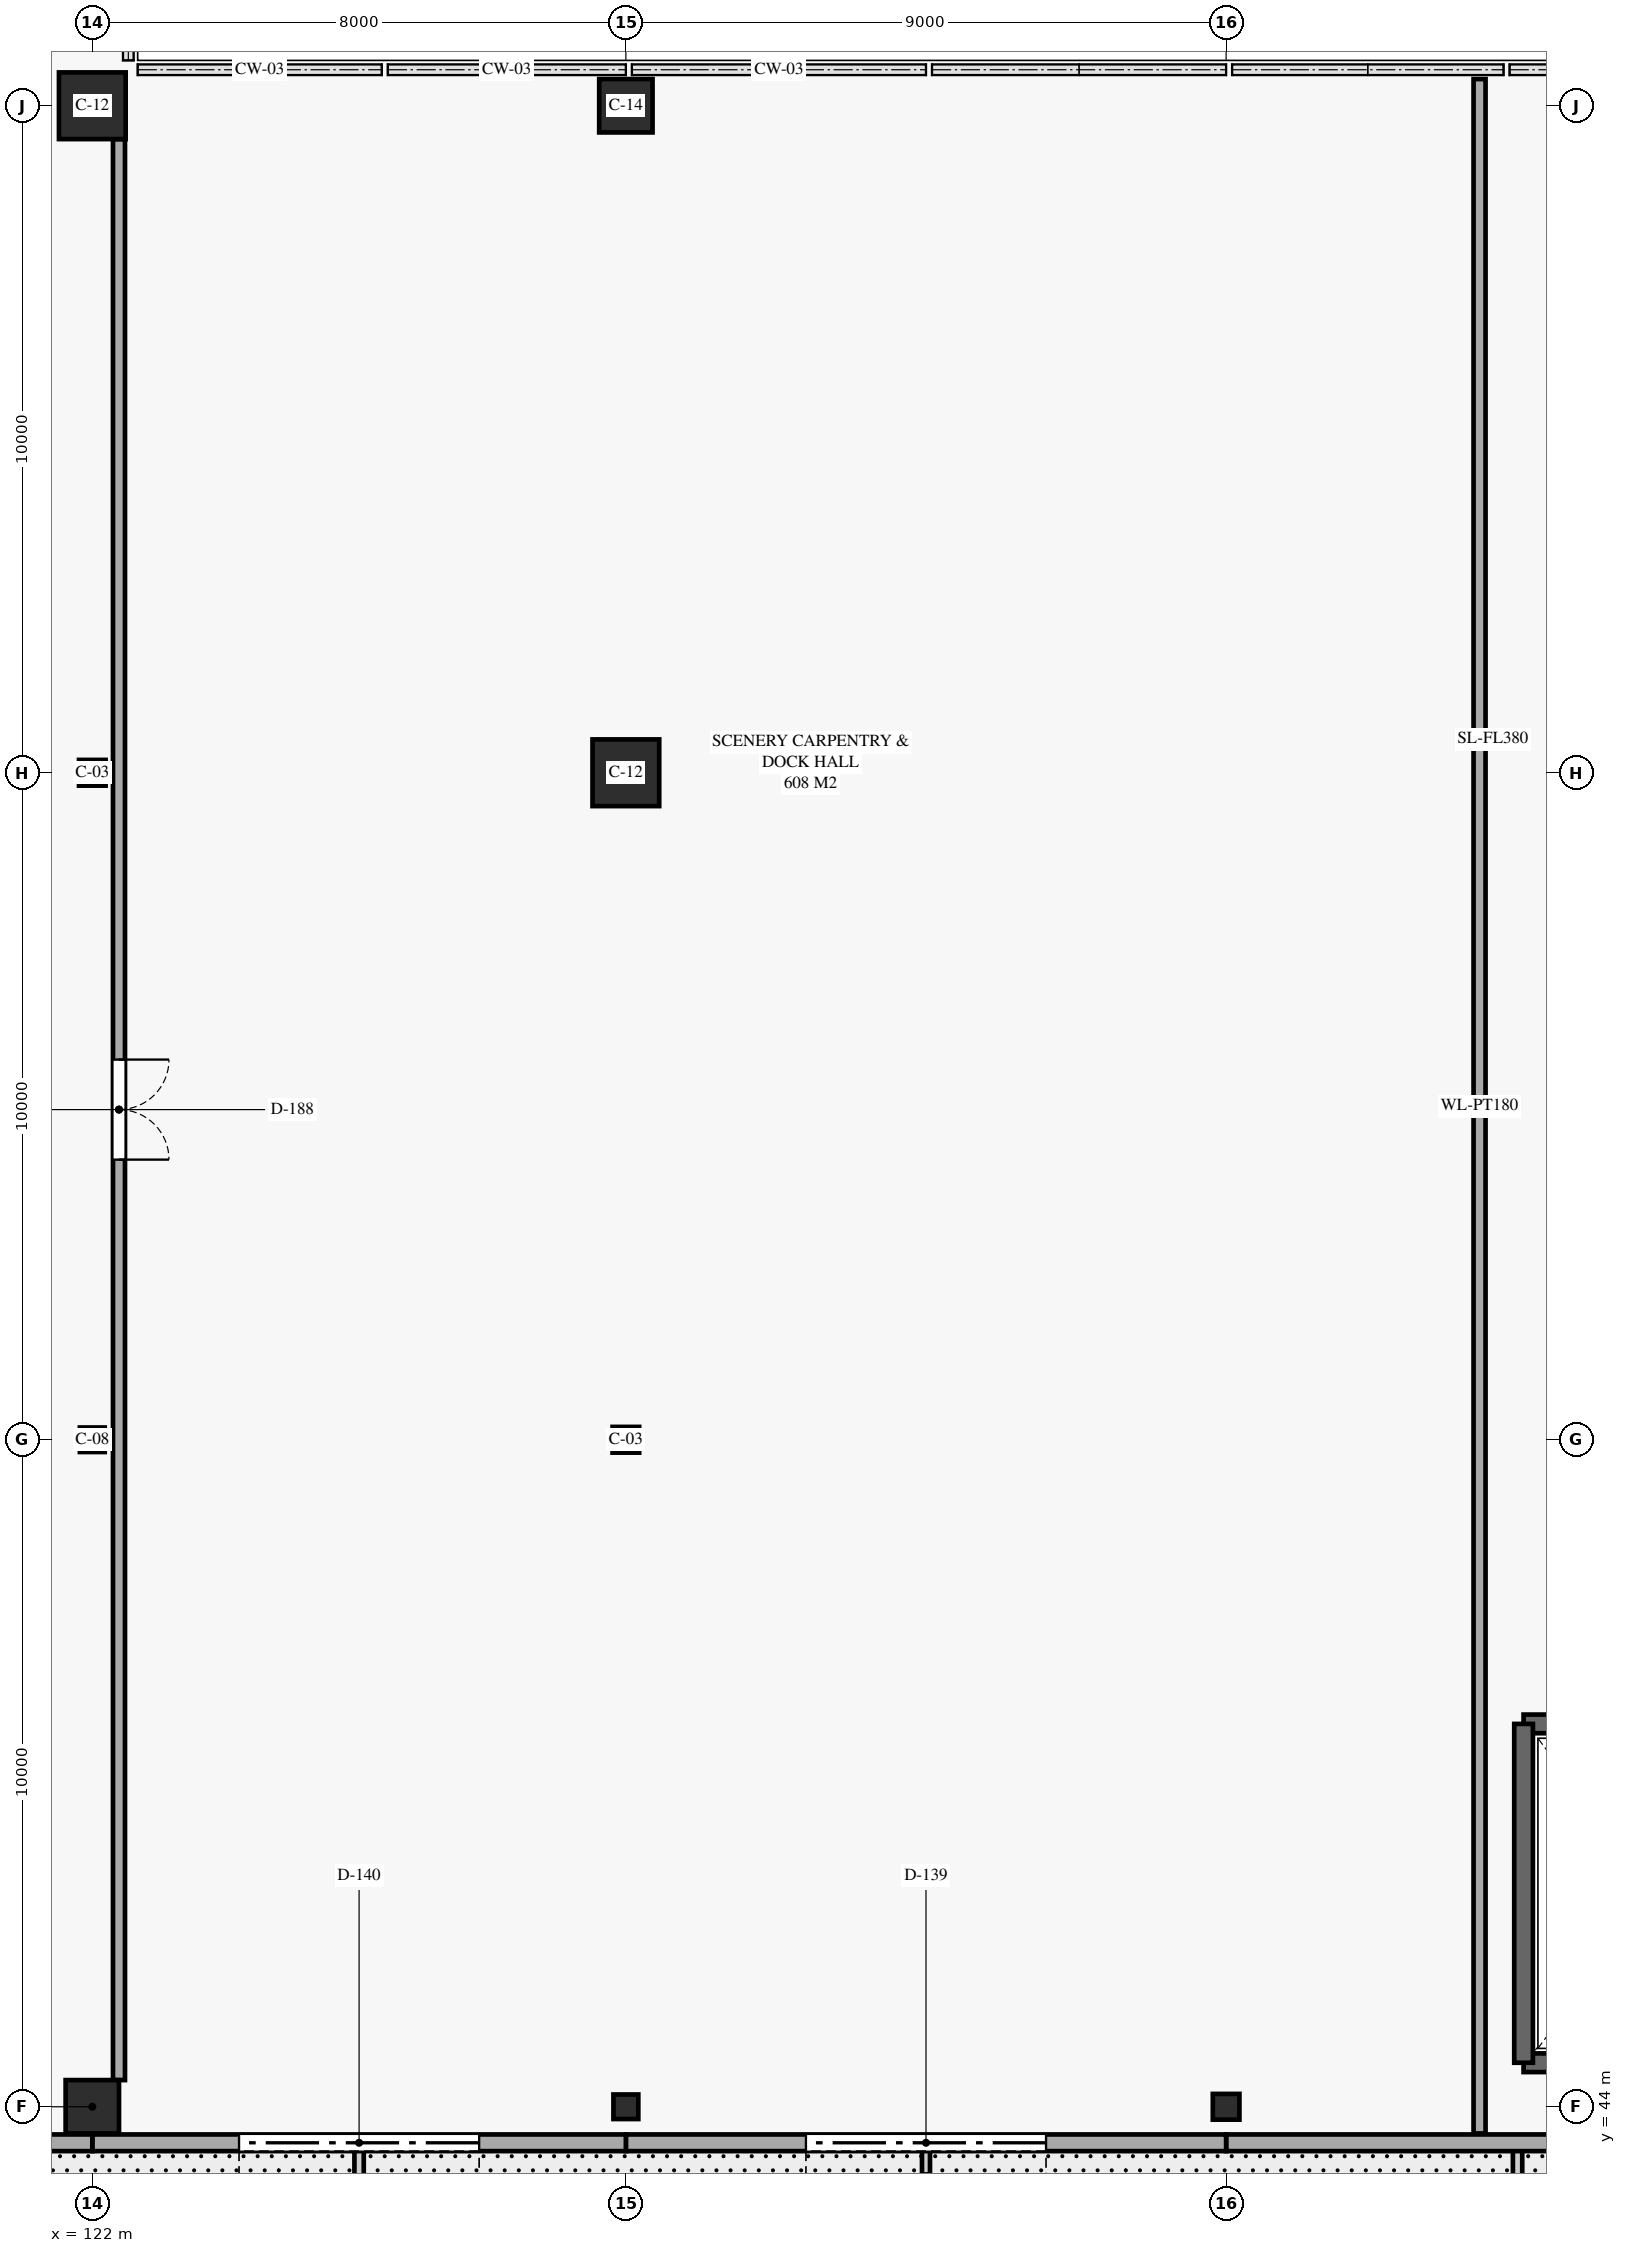
"""IFC4 building model, lengths in metres.
Left out: names, types, materials, properties, quantities, classifications, styles, units other than length and angle.
Written with IfcOpenShell. Run it as: python <this file> out.ifc"""

import sys

from ifc_helpers import new_model, si_unit, direction, frame, frame_2d, origin, origin_2d, place, context, subcontext, project, spatial, rectangle, i_section, extrude, element, fill, save


model = new_model("IFC4")
c1 = context("Model", 3, precision=1e-05, world=origin(), true_north=direction((0.0, 1.0)))
c2 = subcontext(c1, "Body", "Model", "MODEL_VIEW")
j1 = project(units=[si_unit("LENGTHUNIT", "METRE"), si_unit("PLANEANGLEUNIT", "RADIAN")], contexts=[c1])
p1 = place(None, origin())
s1 = spatial("IfcSite", under=j1, at=p1, CompositionType="ELEMENT")
p2 = place(p1, origin())
s2 = spatial("IfcBuilding", under=s1, at=p2, CompositionType="ELEMENT")
p3 = place(p2, origin())
s3 = spatial("IfcBuildingStorey", under=s2, at=p3, CompositionType="ELEMENT", Elevation=0.0)
p4 = place(p3, frame((122.0, 44.0, 0.0), z_axis=(0.0, 0.0, 1.0), x_axis=(1.0, 0.0, 0.0)))
e1 = element("IfcColumn", 1, at=p4, inside=s3, PredefinedType="COLUMN", context=c2, shape_type="SweptSolid", body=[
    extrude(rectangle(XDim=0.8, YDim=0.8, at=origin_2d()), origin(), (0.0, 0.0, 1.0), 5.0),
])
p5 = place(p3, frame((122.0, 54.0, 0.0), z_axis=(0.0, 0.0, 1.0), x_axis=(1.0, 0.0, 0.0)))
e2 = element("IfcColumn", 2, at=p5, inside=s3, PredefinedType="COLUMN", context=c2, shape_type="SweptSolid", body=[
    extrude(i_section(OverallWidth=0.373, OverallDepth=0.368, WebThickness=0.015, FlangeThickness=0.024, FilletRadius=0.015, at=origin_2d()), origin(), (0.0, 0.0, 1.0), 5.0),
])
p6 = place(p3, frame((122.0, 64.0, 0.0), z_axis=(0.0, 0.0, 1.0), x_axis=(1.0, 0.0, 0.0)))
e3 = element("IfcColumn", 3, at=p6, inside=s3, PredefinedType="COLUMN", context=c2, shape_type="SweptSolid", body=[
    extrude(i_section(OverallWidth=0.399, OverallDepth=0.386, WebThickness=0.021, FlangeThickness=0.033, FilletRadius=0.016, at=origin_2d()), origin(), (0.0, 0.0, 1.0), 5.0),
])
p7 = place(p3, frame((122.0, 74.0, 0.0), z_axis=(0.0, 0.0, 1.0), x_axis=(1.0, 0.0, 0.0)))
e4 = element("IfcColumn", 4, at=p7, inside=s3, PredefinedType="COLUMN", context=c2, shape_type="SweptSolid", body=[
    extrude(rectangle(XDim=1.0, YDim=1.0, at=origin_2d()), origin(), (0.0, 0.0, 1.0), 5.0),
])
p8 = place(p3, frame((130.0, 44.0, 0.0), z_axis=(0.0, 0.0, 1.0), x_axis=(1.0, 0.0, 0.0)))
e5 = element("IfcColumn", 5, at=p8, inside=s3, PredefinedType="COLUMN", context=c2, shape_type="SweptSolid", body=[
    extrude(i_section(OverallWidth=0.373, OverallDepth=0.368, WebThickness=0.015, FlangeThickness=0.024, FilletRadius=0.015, at=origin_2d()), origin(), (0.0, 0.0, 1.0), 5.0),
])
p9 = place(p3, frame((130.0, 54.0, 0.0), z_axis=(0.0, 0.0, 1.0), x_axis=(1.0, 0.0, 0.0)))
e6 = element("IfcColumn", 6, at=p9, inside=s3, PredefinedType="COLUMN", context=c2, shape_type="SweptSolid", body=[
    extrude(i_section(OverallWidth=0.399, OverallDepth=0.386, WebThickness=0.021, FlangeThickness=0.033, FilletRadius=0.016, at=origin_2d()), origin(), (0.0, 0.0, 1.0), 4.72),
])
p10 = place(p3, frame((130.0, 64.0, 0.0), z_axis=(0.0, 0.0, 1.0), x_axis=(1.0, 0.0, 0.0)))
e7 = element("IfcColumn", 7, at=p10, inside=s3, PredefinedType="COLUMN", context=c2, shape_type="SweptSolid", body=[
    extrude(rectangle(XDim=1.0, YDim=1.0, at=origin_2d()), origin(), (0.0, 0.0, 1.0), 5.0),
])
p11 = place(p3, frame((130.0, 74.0, 0.0), z_axis=(0.0, 0.0, 1.0), x_axis=(1.0, 0.0, 0.0)))
e8 = element("IfcColumn", 8, at=p11, inside=s3, PredefinedType="COLUMN", context=c2, shape_type="SweptSolid", body=[
    extrude(rectangle(XDim=0.8, YDim=0.8, at=origin_2d()), origin(), (0.0, 0.0, 1.0), 5.0),
])
p12 = place(p3, frame((139.0, 44.0, 0.0), z_axis=(0.0, 0.0, 1.0), x_axis=(1.0, 0.0, 0.0)))
e9 = element("IfcColumn", 9, at=p12, inside=s3, PredefinedType="COLUMN", context=c2, shape_type="SweptSolid", body=[
    extrude(i_section(OverallWidth=0.399, OverallDepth=0.386, WebThickness=0.021, FlangeThickness=0.033, FilletRadius=0.016, at=origin_2d()), origin(), (0.0, 0.0, 1.0), 5.0),
])
for number, where, z_axis, x_axis in (
    (10, (143.46, 44.66, 0.0), (0.0, 0.0, 1.0), (1.0, 0.0, 0.0)),
    (11, (147.34, 49.74, 0.0), (0.0, 0.0, 1.0), (-1.0, 0.0, 0.0)),
):
    element("IfcWall", number, at=place(p3, frame(where, z_axis=z_axis, x_axis=x_axis)), inside=s3, PredefinedType="SHEAR", context=c2, shape_type="SweptSolid", body=[
        extrude(rectangle(XDim=3.88, YDim=0.28, at=frame_2d((1.94, 0.0))), origin(), (0.0, 0.0, 1.0), 4.72),
    ])
p13 = place(p3, frame((143.46, 49.74, 0.0), z_axis=(0.0, 0.0, 1.0), x_axis=(0.0, -1.0, 0.0)))
e12 = element("IfcWall", 12, at=p13, inside=s3, PredefinedType="SHEAR", context=c2, shape_type="SweptSolid", body=[
    extrude(rectangle(XDim=5.08, YDim=0.28, at=frame_2d((2.54, 0.0))), origin(), (0.0, 0.0, 1.0), 4.72),
])
p14 = place(p3, frame((147.74, 43.46, 0.0), z_axis=(0.0, 0.0, 1.0), x_axis=(-1.0, 0.0, 0.0)))
e13 = element("IfcWall", 13, at=p14, inside=s3, PredefinedType="SOLIDWALL", context=c2, shape_type="SweptSolid", body=[
    extrude(rectangle(XDim=8.74, YDim=0.25, at=frame_2d((4.37, 0.0))), origin(), (0.0, 0.0, 1.0), 4.72),
])
p15 = place(p3, frame((139.0, 43.46, 0.0), z_axis=(0.0, 0.0, 1.0), x_axis=(-1.0, 0.0, 0.0)))
e14 = element("IfcWall", 14, at=p15, inside=s3, PredefinedType="SOLIDWALL", context=c2, shape_type="SweptSolid", body=[
    extrude(rectangle(XDim=9.0, YDim=0.25, at=frame_2d((4.5, 0.0))), origin(), (0.0, 0.0, 1.0), 4.72),
])
p16 = place(p15, frame((2.7, 0.0, 0.0)))
e15 = element("IfcOpeningElement", 15, at=p16, cuts=e14, PredefinedType="OPENING", context=c2, shape_type="SweptSolid", body=[
    extrude(rectangle(XDim=3.6, YDim=3.75, at=frame_2d((1.8, 1.875))), frame((0.0, 0.135, 0.0), z_axis=(0.0, -1.0, 0.0), x_axis=(1.0, 0.0, 0.0)), (0.0, 0.0, 1.0), 0.27),
])
p17 = place(p3, frame((130.0, 43.46, 0.0), z_axis=(0.0, 0.0, 1.0), x_axis=(-1.0, 0.0, 0.0)))
e16 = element("IfcWall", 16, at=p17, inside=s3, PredefinedType="SOLIDWALL", context=c2, shape_type="SweptSolid", body=[
    extrude(rectangle(XDim=8.0, YDim=0.25, at=frame_2d((4.0, 0.0))), origin(), (0.0, 0.0, 1.0), 4.72),
])
p18 = place(p17, frame((2.2, 0.0, 0.0)))
e17 = element("IfcOpeningElement", 17, at=p18, cuts=e16, PredefinedType="OPENING", context=c2, shape_type="SweptSolid", body=[
    extrude(rectangle(XDim=3.6, YDim=3.75, at=frame_2d((1.8, 1.875))), frame((0.0, 0.135, 0.0), z_axis=(0.0, -1.0, 0.0), x_axis=(1.0, 0.0, 0.0)), (0.0, 0.0, 1.0), 0.27),
])
p19 = place(p3, frame((122.0, 43.46, 0.0), z_axis=(0.0, 0.0, 1.0), x_axis=(-1.0, 0.0, 0.0)))
e18 = element("IfcWall", 18, at=p19, inside=s3, PredefinedType="SOLIDWALL", context=c2, shape_type="SweptSolid", body=[
    extrude(rectangle(XDim=7.32, YDim=0.25, at=frame_2d((3.66, 0.0))), origin(), (0.0, 0.0, 1.0), 4.7),
])
p20 = place(p19, frame((1.1, 0.0, 0.8)))
e19 = element("IfcOpeningElement", 19, at=p20, cuts=e18, PredefinedType="OPENING", context=c2, shape_type="SweptSolid", body=[
    extrude(rectangle(XDim=1.9, YDim=1.8, at=frame_2d((0.95, 0.9))), frame((0.0, 0.135, 0.0), z_axis=(0.0, -1.0, 0.0), x_axis=(1.0, 0.0, 0.0)), (0.0, 0.0, 1.0), 0.27),
])
p21 = place(p19, frame((4.42, 0.0, 0.8)))
e20 = element("IfcOpeningElement", 20, at=p21, cuts=e18, PredefinedType="OPENING", context=c2, shape_type="SweptSolid", body=[
    extrude(rectangle(XDim=1.7, YDim=1.8, at=frame_2d((0.85, 0.9))), frame((0.0, 0.135, 0.0), z_axis=(0.0, -1.0, 0.0), x_axis=(1.0, 0.0, 0.0)), (0.0, 0.0, 1.0), 0.27),
])
p22 = place(p3, frame((122.4, 73.5, 0.0), z_axis=(0.0, 0.0, 1.0), x_axis=(0.0, -1.0, 0.0)))
e21 = element("IfcWall", 21, at=p22, inside=s3, PredefinedType="PARTITIONING", context=c2, shape_type="SweptSolid", body=[
    extrude(rectangle(XDim=29.1, YDim=0.18, at=frame_2d((14.55, 0.0))), origin(), (0.0, 0.0, 1.0), 3.91),
])
p23 = place(p22, frame((13.8, 0.0, 0.0)))
e22 = element("IfcOpeningElement", 22, at=p23, cuts=e21, PredefinedType="OPENING", context=c2, shape_type="SweptSolid", body=[
    extrude(rectangle(XDim=1.5, YDim=2.25, at=frame_2d((0.75, 1.125))), frame((0.0, 0.1, 0.0), z_axis=(0.0, -1.0, 0.0), x_axis=(1.0, 0.0, 0.0)), (0.0, 0.0, 1.0), 0.2),
])
p24 = place(p3, frame((142.8, 43.6, 0.0), z_axis=(0.0, 0.0, 1.0), x_axis=(0.0, 1.0, 0.0)))
e23 = element("IfcWall", 23, at=p24, inside=s3, PredefinedType="PARTITIONING", context=c2, shape_type="SweptSolid", body=[
    extrude(rectangle(XDim=30.8, YDim=0.18, at=frame_2d((15.4, 0.0))), origin(), (0.0, 0.0, 1.0), 4.72),
])
p25 = place(p16, origin())
e24 = element("IfcDoor", 24, at=p25, inside=s3, OperationType="ROLLINGUP", PredefinedType="GATE", context=c2, shape_type="SweptSolid", body=[
    extrude(rectangle(XDim=3.6, YDim=3.75, at=frame_2d((1.8, 1.875))), frame((0.0, 0.025, 0.0), z_axis=(0.0, -1.0, 0.0), x_axis=(1.0, 0.0, 0.0)), (0.0, 0.0, 1.0), 0.05),
])
fill(e15, e24)
p26 = place(p18, origin())
e25 = element("IfcDoor", 25, at=p26, inside=s3, OperationType="ROLLINGUP", PredefinedType="GATE", context=c2, shape_type="SweptSolid", body=[
    extrude(rectangle(XDim=3.6, YDim=3.75, at=frame_2d((1.8, 1.875))), frame((0.0, 0.025, 0.0), z_axis=(0.0, -1.0, 0.0), x_axis=(1.0, 0.0, 0.0)), (0.0, 0.0, 1.0), 0.05),
])
fill(e17, e25)
p27 = place(p23, origin())
e26 = element("IfcDoor", 26, at=p27, inside=s3, OperationType="DOUBLE_DOOR_SINGLE_SWING", PredefinedType="DOOR", context=c2, shape_type="SweptSolid", body=[
    extrude(rectangle(XDim=1.5, YDim=2.25, at=frame_2d((0.75, 1.125))), frame((0.0, 0.025, 0.0), z_axis=(0.0, -1.0, 0.0), x_axis=(1.0, 0.0, 0.0)), (0.0, 0.0, 1.0), 0.05),
])
fill(e22, e26)
save(model, sys.argv[1])
